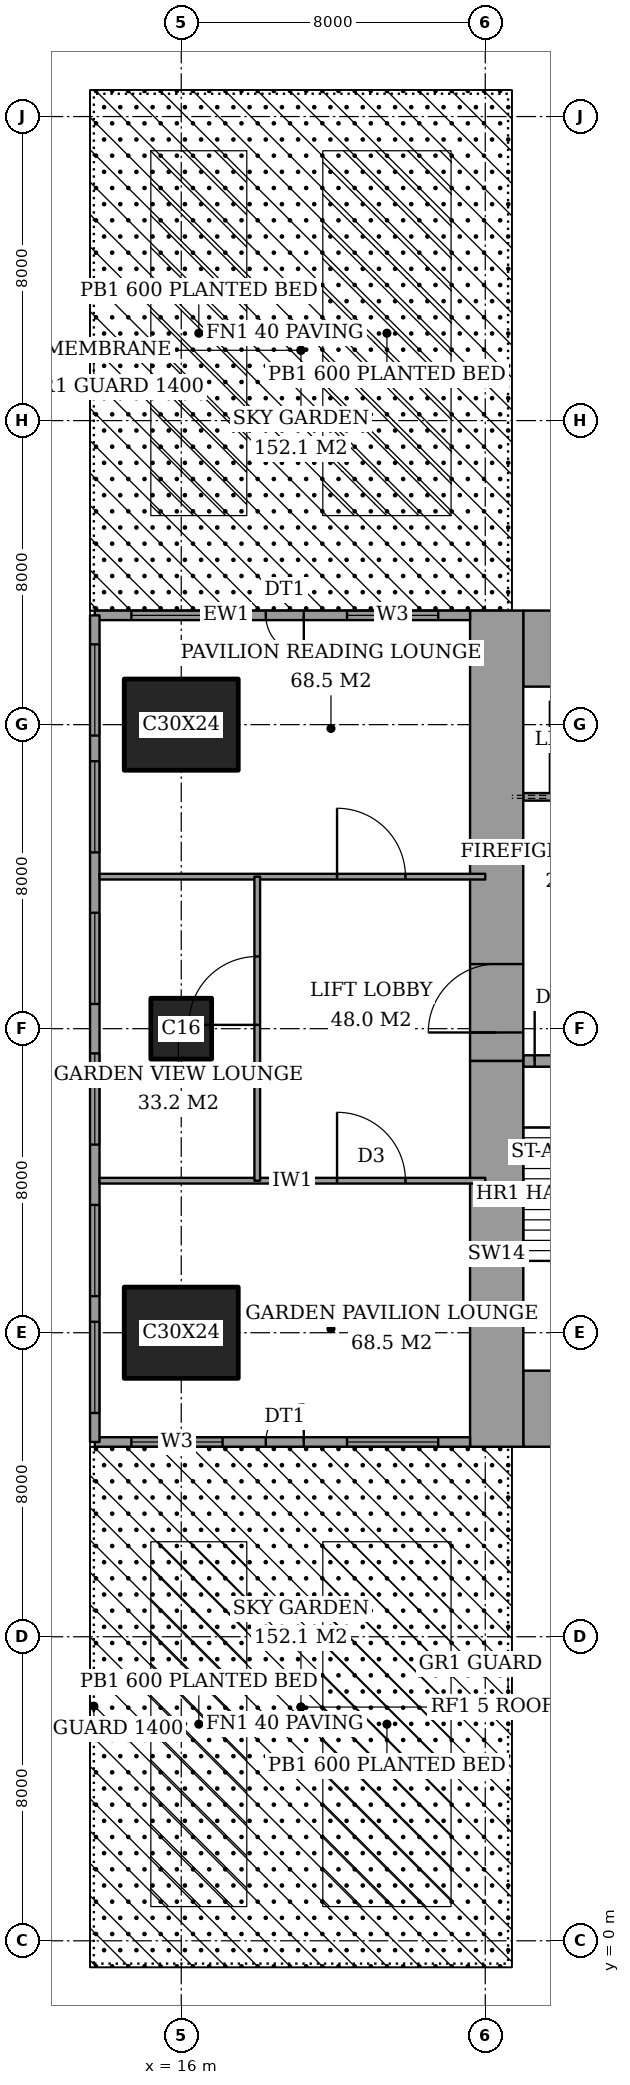
"""IFC4 building model, lengths in metres.
Left out: names, types, materials, properties, quantities, classifications, styles, units other than length and angle.
Written with IfcOpenShell. Run it as: python <this file> out.ifc"""

import sys

from ifc_helpers import new_model, si_unit, direction, frame, frame_2d, origin, origin_2d, place, context, subcontext, project, spatial, rectangle, extrude, element, fill, save


model = new_model("IFC4")
c1 = context("Model", 3, precision=1e-05, world=origin(), true_north=direction((0.0, 1.0)))
c2 = subcontext(c1, "Body", "Model", "MODEL_VIEW")
j1 = project(units=[si_unit("LENGTHUNIT", "METRE"), si_unit("PLANEANGLEUNIT", "RADIAN")], contexts=[c1])
p1 = place(None, origin())
s1 = spatial("IfcSite", under=j1, at=p1, CompositionType="ELEMENT")
p2 = place(p1, origin())
s2 = spatial("IfcBuilding", under=s1, at=p2, CompositionType="ELEMENT")
p3 = place(p2, frame((0.0, 0.0, 225.4)))
s3 = spatial("IfcBuildingStorey", under=s2, at=p3, CompositionType="ELEMENT", Elevation=225.4)
p4 = place(p3, frame((16.0, 16.0, 0.0), z_axis=(0.0, 0.0, 1.0), x_axis=(1.0, 0.0, 0.0)))
e1 = element("IfcColumn", 1, at=p4, inside=s3, PredefinedType="COLUMN", context=c2, shape_type="SweptSolid", body=[
    extrude(rectangle(XDim=3.0, YDim=2.4, at=origin_2d()), origin(), (0.0, 0.0, 1.0), 5.0),
])
p5 = place(p3, frame((16.0, 24.0, 0.0), z_axis=(0.0, 0.0, 1.0), x_axis=(1.0, 0.0, 0.0)))
e2 = element("IfcColumn", 2, at=p5, inside=s3, PredefinedType="COLUMN", context=c2, shape_type="SweptSolid", body=[
    extrude(rectangle(XDim=1.6, YDim=1.6, at=origin_2d()), origin(), (0.0, 0.0, 1.0), 5.0),
])
p6 = place(p3, frame((16.0, 32.0, 0.0), z_axis=(0.0, 0.0, 1.0), x_axis=(1.0, 0.0, 0.0)))
e3 = element("IfcColumn", 3, at=p6, inside=s3, PredefinedType="COLUMN", context=c2, shape_type="SweptSolid", body=[
    extrude(rectangle(XDim=3.0, YDim=2.4, at=origin_2d()), origin(), (0.0, 0.0, 1.0), 5.0),
])
for number, where, z_axis, x_axis in (
    (4, (25.0, 14.0, 0.0), (0.0, 0.0, 1.0), (1.0, 0.0, 0.0)),
    (5, (25.0, 34.0, 0.0), (0.0, 0.0, 1.0), (1.0, 0.0, 0.0)),
):
    element("IfcWall", number, at=place(p3, frame(where, z_axis=z_axis, x_axis=x_axis)), inside=s3, PredefinedType="SHEAR", context=c2, shape_type="SweptSolid", body=[
        extrude(rectangle(XDim=3.15, YDim=2.0, at=frame_2d((1.575, 0.0))), origin(), (0.0, 0.0, 1.0), 5.0),
    ])
p7 = place(p3, frame((24.3, 13.0, 0.0), z_axis=(0.0, 0.0, 1.0), x_axis=(0.0, 1.0, 0.0)))
e6 = element("IfcWall", 6, at=p7, inside=s3, PredefinedType="SHEAR", context=c2, shape_type="SweptSolid", body=[
    extrude(rectangle(XDim=10.15, YDim=1.4, at=frame_2d((5.075, 0.0))), origin(), (0.0, 0.0, 1.0), 5.0),
])
p8 = place(p3, frame((24.3, 23.15, 0.0), z_axis=(0.0, 0.0, 1.0), x_axis=(0.0, 1.0, 0.0)))
e7 = element("IfcWall", 7, at=p8, inside=s3, PredefinedType="SHEAR", context=c2, shape_type="SweptSolid", body=[
    extrude(rectangle(XDim=11.85, YDim=1.4, at=frame_2d((5.925, 0.0))), origin(), (0.0, 0.0, 1.0), 5.0),
])
p9 = place(p8, frame((0.75, 0.0, 0.0)))
e8 = element("IfcOpeningElement", 8, at=p9, cuts=e7, PredefinedType="OPENING", context=c2, shape_type="SweptSolid", body=[
    extrude(rectangle(XDim=1.8, YDim=2.4, at=frame_2d((0.9, 1.2))), frame((0.0, 0.71, 0.0), z_axis=(0.0, -1.0, 0.0), x_axis=(1.0, 0.0, 0.0)), (0.0, 0.0, 1.0), 1.42),
])
p10 = place(p3, frame((25.0, 23.15, 0.0), z_axis=(0.0, 0.0, 1.0), x_axis=(1.0, 0.0, 0.0)))
e9 = element("IfcWall", 9, at=p10, inside=s3, PredefinedType="SHEAR", context=c2, shape_type="SweptSolid", body=[
    extrude(rectangle(XDim=3.15, YDim=0.3, at=frame_2d((1.575, 0.0))), origin(), (0.0, 0.0, 1.0), 5.0),
])
p11 = place(p10, frame((0.3, 0.0, 0.0)))
e10 = element("IfcOpeningElement", 10, at=p11, cuts=e9, PredefinedType="OPENING", context=c2, shape_type="SweptSolid", body=[
    extrude(rectangle(XDim=1.6, YDim=2.1, at=frame_2d((0.8, 1.05))), frame((0.0, 0.16, 0.0), z_axis=(0.0, -1.0, 0.0), x_axis=(1.0, 0.0, 0.0)), (0.0, 0.0, 1.0), 0.32),
])
p12 = place(p3, frame((13.725, 13.125, 0.0), z_axis=(0.0, 0.0, 1.0), x_axis=(1.0, 0.0, 0.0)))
e11 = element("IfcWall", 11, at=p12, inside=s3, PredefinedType="SOLIDWALL", context=c2, shape_type="SweptSolid", body=[
    extrude(rectangle(XDim=9.875, YDim=0.25, at=frame_2d((4.938, 0.0))), origin(), (0.0, 0.0, 1.0), 5.0),
])
p13 = place(p12, frame((4.5, 0.0, 0.0)))
e12 = element("IfcOpeningElement", 12, at=p13, cuts=e11, PredefinedType="OPENING", context=c2, shape_type="SweptSolid", body=[
    extrude(rectangle(XDim=1.0, YDim=2.4, at=frame_2d((0.5, 1.2))), frame((0.0, 0.135, 0.0), z_axis=(0.0, -1.0, 0.0), x_axis=(1.0, 0.0, 0.0)), (0.0, 0.0, 1.0), 0.27),
])
p14 = place(p12, frame((0.962, 0.0, 0.6)))
e13 = element("IfcOpeningElement", 13, at=p14, cuts=e11, PredefinedType="OPENING", context=c2, shape_type="SweptSolid", body=[
    extrude(rectangle(XDim=2.4, YDim=3.0, at=frame_2d((1.2, 1.5))), frame((0.0, 0.135, 0.0), z_axis=(0.0, -1.0, 0.0), x_axis=(1.0, 0.0, 0.0)), (0.0, 0.0, 1.0), 0.27),
])
p15 = place(p12, frame((6.637, 0.0, 0.6)))
e14 = element("IfcOpeningElement", 14, at=p15, cuts=e11, PredefinedType="OPENING", context=c2, shape_type="SweptSolid", body=[
    extrude(rectangle(XDim=2.4, YDim=3.0, at=frame_2d((1.2, 1.5))), frame((0.0, 0.135, 0.0), z_axis=(0.0, -1.0, 0.0), x_axis=(1.0, 0.0, 0.0)), (0.0, 0.0, 1.0), 0.27),
])
p16 = place(p3, frame((23.6, 34.875, 0.0), z_axis=(0.0, 0.0, 1.0), x_axis=(-1.0, 0.0, 0.0)))
e15 = element("IfcWall", 15, at=p16, inside=s3, PredefinedType="SOLIDWALL", context=c2, shape_type="SweptSolid", body=[
    extrude(rectangle(XDim=9.875, YDim=0.25, at=frame_2d((4.938, 0.0))), origin(), (0.0, 0.0, 1.0), 5.0),
])
p17 = place(p16, frame((4.375, 0.0, 0.0)))
e16 = element("IfcOpeningElement", 16, at=p17, cuts=e15, PredefinedType="OPENING", context=c2, shape_type="SweptSolid", body=[
    extrude(rectangle(XDim=1.0, YDim=2.4, at=frame_2d((0.5, 1.2))), frame((0.0, 0.135, 0.0), z_axis=(0.0, -1.0, 0.0), x_axis=(1.0, 0.0, 0.0)), (0.0, 0.0, 1.0), 0.27),
])
p18 = place(p16, frame((0.837, 0.0, 0.6)))
e17 = element("IfcOpeningElement", 17, at=p18, cuts=e15, PredefinedType="OPENING", context=c2, shape_type="SweptSolid", body=[
    extrude(rectangle(XDim=2.4, YDim=3.0, at=frame_2d((1.2, 1.5))), frame((0.0, 0.135, 0.0), z_axis=(0.0, -1.0, 0.0), x_axis=(1.0, 0.0, 0.0)), (0.0, 0.0, 1.0), 0.27),
])
p19 = place(p16, frame((6.512, 0.0, 0.6)))
e18 = element("IfcOpeningElement", 18, at=p19, cuts=e15, PredefinedType="OPENING", context=c2, shape_type="SweptSolid", body=[
    extrude(rectangle(XDim=2.4, YDim=3.0, at=frame_2d((1.2, 1.5))), frame((0.0, 0.135, 0.0), z_axis=(0.0, -1.0, 0.0), x_axis=(1.0, 0.0, 0.0)), (0.0, 0.0, 1.0), 0.27),
])
p20 = place(p3, frame((13.725, 34.875, 0.0), z_axis=(0.0, 0.0, 1.0), x_axis=(0.0, -1.0, 0.0)))
e19 = element("IfcWall", 19, at=p20, inside=s3, PredefinedType="SOLIDWALL", context=c2, shape_type="SweptSolid", body=[
    extrude(rectangle(XDim=21.75, YDim=0.25, at=frame_2d((10.875, 0.0))), origin(), (0.0, 0.0, 1.0), 5.0),
])
p21 = place(p20, frame((0.762, 0.0, 0.6)))
e20 = element("IfcOpeningElement", 20, at=p21, cuts=e19, PredefinedType="OPENING", context=c2, shape_type="SweptSolid", body=[
    extrude(rectangle(XDim=2.4, YDim=3.0, at=frame_2d((1.2, 1.5))), frame((0.0, 0.135, 0.0), z_axis=(0.0, -1.0, 0.0), x_axis=(1.0, 0.0, 0.0)), (0.0, 0.0, 1.0), 0.27),
])
p22 = place(p20, frame((3.837, 0.0, 0.6)))
e21 = element("IfcOpeningElement", 21, at=p22, cuts=e19, PredefinedType="OPENING", context=c2, shape_type="SweptSolid", body=[
    extrude(rectangle(XDim=2.4, YDim=3.0, at=frame_2d((1.2, 1.5))), frame((0.0, 0.135, 0.0), z_axis=(0.0, -1.0, 0.0), x_axis=(1.0, 0.0, 0.0)), (0.0, 0.0, 1.0), 0.27),
])
p23 = place(p20, frame((7.825, 0.0, 0.6)))
e22 = element("IfcOpeningElement", 22, at=p23, cuts=e19, PredefinedType="OPENING", context=c2, shape_type="SweptSolid", body=[
    extrude(rectangle(XDim=2.4, YDim=3.0, at=frame_2d((1.2, 1.5))), frame((0.0, 0.135, 0.0), z_axis=(0.0, -1.0, 0.0), x_axis=(1.0, 0.0, 0.0)), (0.0, 0.0, 1.0), 0.27),
])
p24 = place(p20, frame((11.525, 0.0, 0.6)))
e23 = element("IfcOpeningElement", 23, at=p24, cuts=e19, PredefinedType="OPENING", context=c2, shape_type="SweptSolid", body=[
    extrude(rectangle(XDim=2.4, YDim=3.0, at=frame_2d((1.2, 1.5))), frame((0.0, 0.135, 0.0), z_axis=(0.0, -1.0, 0.0), x_axis=(1.0, 0.0, 0.0)), (0.0, 0.0, 1.0), 0.27),
])
p25 = place(p20, frame((15.512, 0.0, 0.6)))
e24 = element("IfcOpeningElement", 24, at=p25, cuts=e19, PredefinedType="OPENING", context=c2, shape_type="SweptSolid", body=[
    extrude(rectangle(XDim=2.4, YDim=3.0, at=frame_2d((1.2, 1.5))), frame((0.0, 0.135, 0.0), z_axis=(0.0, -1.0, 0.0), x_axis=(1.0, 0.0, 0.0)), (0.0, 0.0, 1.0), 0.27),
])
p26 = place(p20, frame((18.587, 0.0, 0.6)))
e25 = element("IfcOpeningElement", 25, at=p26, cuts=e19, PredefinedType="OPENING", context=c2, shape_type="SweptSolid", body=[
    extrude(rectangle(XDim=2.4, YDim=3.0, at=frame_2d((1.2, 1.5))), frame((0.0, 0.135, 0.0), z_axis=(0.0, -1.0, 0.0), x_axis=(1.0, 0.0, 0.0)), (0.0, 0.0, 1.0), 0.27),
])
p27 = place(p3, frame((13.85, 20.0, 0.0), z_axis=(0.0, 0.0, 1.0), x_axis=(1.0, 0.0, 0.0)))
e26 = element("IfcWall", 26, at=p27, inside=s3, PredefinedType="PARTITIONING", context=c2, shape_type="SweptSolid", body=[
    extrude(rectangle(XDim=10.15, YDim=0.15, at=frame_2d((5.075, 0.0))), origin(), (0.0, 0.0, 1.0), 4.75),
])
p28 = place(p27, frame((6.25, 0.0, 0.0)))
e27 = element("IfcOpeningElement", 27, at=p28, cuts=e26, PredefinedType="OPENING", context=c2, shape_type="SweptSolid", body=[
    extrude(rectangle(XDim=1.8, YDim=2.1, at=frame_2d((0.9, 1.05))), frame((0.0, 0.085, 0.0), z_axis=(0.0, -1.0, 0.0), x_axis=(1.0, 0.0, 0.0)), (0.0, 0.0, 1.0), 0.17),
])
p29 = place(p3, frame((13.85, 28.0, 0.0), z_axis=(0.0, 0.0, 1.0), x_axis=(1.0, 0.0, 0.0)))
e28 = element("IfcWall", 28, at=p29, inside=s3, PredefinedType="PARTITIONING", context=c2, shape_type="SweptSolid", body=[
    extrude(rectangle(XDim=10.15, YDim=0.15, at=frame_2d((5.075, 0.0))), origin(), (0.0, 0.0, 1.0), 4.75),
])
p30 = place(p29, frame((6.25, 0.0, 0.0)))
e29 = element("IfcOpeningElement", 29, at=p30, cuts=e28, PredefinedType="OPENING", context=c2, shape_type="SweptSolid", body=[
    extrude(rectangle(XDim=1.8, YDim=2.1, at=frame_2d((0.9, 1.05))), frame((0.0, 0.085, 0.0), z_axis=(0.0, -1.0, 0.0), x_axis=(1.0, 0.0, 0.0)), (0.0, 0.0, 1.0), 0.17),
])
p31 = place(p3, frame((18.0, 20.0, 0.0), z_axis=(0.0, 0.0, 1.0), x_axis=(0.0, 1.0, 0.0)))
e30 = element("IfcWall", 30, at=p31, inside=s3, PredefinedType="PARTITIONING", context=c2, shape_type="SweptSolid", body=[
    extrude(rectangle(XDim=8.0, YDim=0.15, at=frame_2d((4.0, 0.0))), origin(), (0.0, 0.0, 1.0), 4.75),
])
p32 = place(p31, frame((4.1, 0.0, 0.0)))
e31 = element("IfcOpeningElement", 31, at=p32, cuts=e30, PredefinedType="OPENING", context=c2, shape_type="SweptSolid", body=[
    extrude(rectangle(XDim=1.8, YDim=2.1, at=frame_2d((0.9, 1.05))), frame((0.0, 0.085, 0.0), z_axis=(0.0, -1.0, 0.0), x_axis=(1.0, 0.0, 0.0)), (0.0, 0.0, 1.0), 0.17),
])
p33 = place(p3, frame((25.0, 30.1, 0.0), z_axis=(0.0, 0.0, 1.0), x_axis=(1.0, 0.0, 0.0)))
e32 = element("IfcWall", 32, at=p33, inside=s3, PredefinedType="PARTITIONING", context=c2, shape_type="SweptSolid", body=[
    extrude(rectangle(XDim=12.7, YDim=0.2, at=frame_2d((6.35, 0.0))), origin(), (0.0, 0.0, 1.0), 5.0),
])
p34 = place(p33, frame((4.25, 0.0, 0.0)))
e33 = element("IfcOpeningElement", 33, at=p34, cuts=e32, PredefinedType="OPENING", context=c2, shape_type="SweptSolid", body=[
    extrude(rectangle(XDim=1.1, YDim=2.1, at=frame_2d((0.55, 1.05))), frame((0.0, 0.11, 0.0), z_axis=(0.0, -1.0, 0.0), x_axis=(1.0, 0.0, 0.0)), (0.0, 0.0, 1.0), 0.22),
])
p35 = place(p33, frame((7.45, 0.0, 0.0)))
e34 = element("IfcOpeningElement", 34, at=p35, cuts=e32, PredefinedType="OPENING", context=c2, shape_type="SweptSolid", body=[
    extrude(rectangle(XDim=1.1, YDim=2.1, at=frame_2d((0.55, 1.05))), frame((0.0, 0.11, 0.0), z_axis=(0.0, -1.0, 0.0), x_axis=(1.0, 0.0, 0.0)), (0.0, 0.0, 1.0), 0.22),
])
p36 = place(p33, frame((10.65, 0.0, 0.0)))
e35 = element("IfcOpeningElement", 35, at=p36, cuts=e32, PredefinedType="OPENING", context=c2, shape_type="SweptSolid", body=[
    extrude(rectangle(XDim=1.1, YDim=2.1, at=frame_2d((0.55, 1.05))), frame((0.0, 0.11, 0.0), z_axis=(0.0, -1.0, 0.0), x_axis=(1.0, 0.0, 0.0)), (0.0, 0.0, 1.0), 0.22),
])
p37 = place(p33, frame((0.9, 0.0, 0.0)))
e36 = element("IfcOpeningElement", 36, at=p37, cuts=e32, PredefinedType="OPENING", context=c2, shape_type="SweptSolid", body=[
    extrude(rectangle(XDim=1.2, YDim=2.1, at=frame_2d((0.6, 1.05))), frame((0.0, 0.11, 0.0), z_axis=(0.0, -1.0, 0.0), x_axis=(1.0, 0.0, 0.0)), (0.0, 0.0, 1.0), 0.22),
])
p38 = place(p13, origin())
e37 = element("IfcDoor", 37, at=p38, inside=s3, OperationType="SINGLE_SWING_LEFT", PredefinedType="DOOR", context=c2, shape_type="SweptSolid", body=[
    extrude(rectangle(XDim=1.0, YDim=2.4, at=frame_2d((0.5, 1.2))), frame((0.0, 0.025, 0.0), z_axis=(0.0, -1.0, 0.0), x_axis=(1.0, 0.0, 0.0)), (0.0, 0.0, 1.0), 0.05),
])
fill(e12, e37)
p39 = place(p14, origin())
e38 = element("IfcWindow", 38, at=p39, inside=s3, PartitioningType="SINGLE_PANEL", PredefinedType="WINDOW", context=c2, shape_type="SweptSolid", body=[
    extrude(rectangle(XDim=2.4, YDim=3.0, at=frame_2d((1.2, 1.5))), frame((0.0, 0.03, 0.0), z_axis=(0.0, -1.0, 0.0), x_axis=(1.0, 0.0, 0.0)), (0.0, 0.0, 1.0), 0.06),
])
fill(e13, e38)
p40 = place(p15, origin())
e39 = element("IfcWindow", 39, at=p40, inside=s3, PartitioningType="SINGLE_PANEL", PredefinedType="WINDOW", context=c2, shape_type="SweptSolid", body=[
    extrude(rectangle(XDim=2.4, YDim=3.0, at=frame_2d((1.2, 1.5))), frame((0.0, 0.03, 0.0), z_axis=(0.0, -1.0, 0.0), x_axis=(1.0, 0.0, 0.0)), (0.0, 0.0, 1.0), 0.06),
])
fill(e14, e39)
p41 = place(p17, origin())
e40 = element("IfcDoor", 40, at=p41, inside=s3, OperationType="SINGLE_SWING_RIGHT", PredefinedType="DOOR", context=c2, shape_type="SweptSolid", body=[
    extrude(rectangle(XDim=1.0, YDim=2.4, at=frame_2d((0.5, 1.2))), frame((0.0, 0.025, 0.0), z_axis=(0.0, -1.0, 0.0), x_axis=(1.0, 0.0, 0.0)), (0.0, 0.0, 1.0), 0.05),
])
fill(e16, e40)
p42 = place(p18, origin())
e41 = element("IfcWindow", 41, at=p42, inside=s3, PartitioningType="SINGLE_PANEL", PredefinedType="WINDOW", context=c2, shape_type="SweptSolid", body=[
    extrude(rectangle(XDim=2.4, YDim=3.0, at=frame_2d((1.2, 1.5))), frame((0.0, 0.03, 0.0), z_axis=(0.0, -1.0, 0.0), x_axis=(1.0, 0.0, 0.0)), (0.0, 0.0, 1.0), 0.06),
])
fill(e17, e41)
p43 = place(p19, origin())
e42 = element("IfcWindow", 42, at=p43, inside=s3, PartitioningType="SINGLE_PANEL", PredefinedType="WINDOW", context=c2, shape_type="SweptSolid", body=[
    extrude(rectangle(XDim=2.4, YDim=3.0, at=frame_2d((1.2, 1.5))), frame((0.0, 0.03, 0.0), z_axis=(0.0, -1.0, 0.0), x_axis=(1.0, 0.0, 0.0)), (0.0, 0.0, 1.0), 0.06),
])
fill(e18, e42)
p44 = place(p21, origin())
e43 = element("IfcWindow", 43, at=p44, inside=s3, PartitioningType="SINGLE_PANEL", PredefinedType="WINDOW", context=c2, shape_type="SweptSolid", body=[
    extrude(rectangle(XDim=2.4, YDim=3.0, at=frame_2d((1.2, 1.5))), frame((0.0, 0.03, 0.0), z_axis=(0.0, -1.0, 0.0), x_axis=(1.0, 0.0, 0.0)), (0.0, 0.0, 1.0), 0.06),
])
fill(e20, e43)
p45 = place(p22, origin())
e44 = element("IfcWindow", 44, at=p45, inside=s3, PartitioningType="SINGLE_PANEL", PredefinedType="WINDOW", context=c2, shape_type="SweptSolid", body=[
    extrude(rectangle(XDim=2.4, YDim=3.0, at=frame_2d((1.2, 1.5))), frame((0.0, 0.03, 0.0), z_axis=(0.0, -1.0, 0.0), x_axis=(1.0, 0.0, 0.0)), (0.0, 0.0, 1.0), 0.06),
])
fill(e21, e44)
p46 = place(p23, origin())
e45 = element("IfcWindow", 45, at=p46, inside=s3, PartitioningType="SINGLE_PANEL", PredefinedType="WINDOW", context=c2, shape_type="SweptSolid", body=[
    extrude(rectangle(XDim=2.4, YDim=3.0, at=frame_2d((1.2, 1.5))), frame((0.0, 0.03, 0.0), z_axis=(0.0, -1.0, 0.0), x_axis=(1.0, 0.0, 0.0)), (0.0, 0.0, 1.0), 0.06),
])
fill(e22, e45)
p47 = place(p24, origin())
e46 = element("IfcWindow", 46, at=p47, inside=s3, PartitioningType="SINGLE_PANEL", PredefinedType="WINDOW", context=c2, shape_type="SweptSolid", body=[
    extrude(rectangle(XDim=2.4, YDim=3.0, at=frame_2d((1.2, 1.5))), frame((0.0, 0.03, 0.0), z_axis=(0.0, -1.0, 0.0), x_axis=(1.0, 0.0, 0.0)), (0.0, 0.0, 1.0), 0.06),
])
fill(e23, e46)
p48 = place(p25, origin())
e47 = element("IfcWindow", 47, at=p48, inside=s3, PartitioningType="SINGLE_PANEL", PredefinedType="WINDOW", context=c2, shape_type="SweptSolid", body=[
    extrude(rectangle(XDim=2.4, YDim=3.0, at=frame_2d((1.2, 1.5))), frame((0.0, 0.03, 0.0), z_axis=(0.0, -1.0, 0.0), x_axis=(1.0, 0.0, 0.0)), (0.0, 0.0, 1.0), 0.06),
])
fill(e24, e47)
p49 = place(p26, origin())
e48 = element("IfcWindow", 48, at=p49, inside=s3, PartitioningType="SINGLE_PANEL", PredefinedType="WINDOW", context=c2, shape_type="SweptSolid", body=[
    extrude(rectangle(XDim=2.4, YDim=3.0, at=frame_2d((1.2, 1.5))), frame((0.0, 0.03, 0.0), z_axis=(0.0, -1.0, 0.0), x_axis=(1.0, 0.0, 0.0)), (0.0, 0.0, 1.0), 0.06),
])
fill(e25, e48)
p50 = place(p28, origin())
e49 = element("IfcDoor", 49, at=p50, inside=s3, OperationType="DOUBLE_DOOR_DOUBLE_SWING", PredefinedType="DOOR", context=c2, shape_type="SweptSolid", body=[
    extrude(rectangle(XDim=1.8, YDim=2.1, at=frame_2d((0.9, 1.05))), frame((0.0, 0.025, 0.0), z_axis=(0.0, -1.0, 0.0), x_axis=(1.0, 0.0, 0.0)), (0.0, 0.0, 1.0), 0.05),
])
fill(e27, e49)
p51 = place(p32, origin())
e50 = element("IfcDoor", 50, at=p51, inside=s3, OperationType="DOUBLE_DOOR_DOUBLE_SWING", PredefinedType="DOOR", context=c2, shape_type="SweptSolid", body=[
    extrude(rectangle(XDim=1.8, YDim=2.1, at=frame_2d((0.9, 1.05))), frame((0.0, 0.025, 0.0), z_axis=(0.0, -1.0, 0.0), x_axis=(1.0, 0.0, 0.0)), (0.0, 0.0, 1.0), 0.05),
])
fill(e31, e50)
p52 = place(p30, origin())
e51 = element("IfcDoor", 51, at=p52, inside=s3, OperationType="DOUBLE_DOOR_DOUBLE_SWING", PredefinedType="DOOR", context=c2, shape_type="SweptSolid", body=[
    extrude(rectangle(XDim=1.8, YDim=2.1, at=frame_2d((0.9, 1.05))), frame((0.0, 0.025, 0.0), z_axis=(0.0, -1.0, 0.0), x_axis=(1.0, 0.0, 0.0)), (0.0, 0.0, 1.0), 0.05),
])
fill(e29, e51)
p53 = place(p11, origin())
e52 = element("IfcDoor", 52, at=p53, inside=s3, OperationType="DOUBLE_DOOR_SINGLE_SWING", PredefinedType="DOOR", context=c2, shape_type="SweptSolid", body=[
    extrude(rectangle(XDim=1.6, YDim=2.1, at=frame_2d((0.8, 1.05))), frame((0.0, 0.025, 0.0), z_axis=(0.0, -1.0, 0.0), x_axis=(1.0, 0.0, 0.0)), (0.0, 0.0, 1.0), 0.05),
])
fill(e10, e52)
p54 = place(p9, origin())
e53 = element("IfcDoor", 53, at=p54, inside=s3, OperationType="DOUBLE_DOOR_DOUBLE_SWING", PredefinedType="DOOR", context=c2, shape_type="SweptSolid", body=[
    extrude(rectangle(XDim=1.8, YDim=2.4, at=frame_2d((0.9, 1.2))), frame((0.0, 0.025, 0.0), z_axis=(0.0, -1.0, 0.0), x_axis=(1.0, 0.0, 0.0)), (0.0, 0.0, 1.0), 0.05),
])
fill(e8, e53)
save(model, sys.argv[1])
